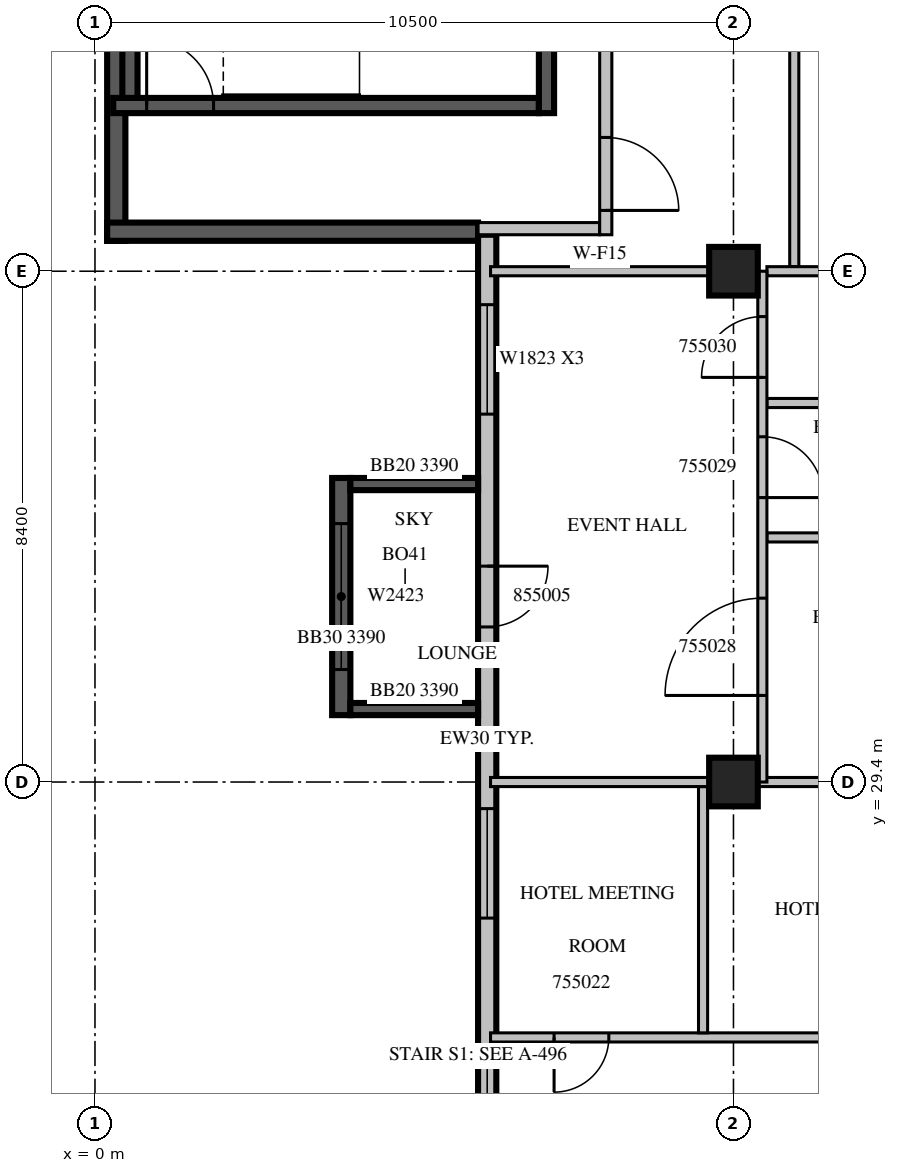
"""IFC4 building model, lengths in metres.
Left out: names, types, materials, properties, quantities, classifications, styles, units other than length and angle.
Written with IfcOpenShell. Run it as: python <this file> out.ifc"""

import sys

from ifc_helpers import new_model, si_unit, direction, frame, frame_2d, origin, origin_2d, place, context, subcontext, project, spatial, rectangle, extrude, source, transform, mapped, element, fill, save


model = new_model("IFC4")
c1 = context("Model", 3, precision=1e-05, world=origin(), true_north=direction((0.0, 1.0)))
c2 = subcontext(c1, "Body", "Model", "MODEL_VIEW")
j1 = project(units=[si_unit("LENGTHUNIT", "METRE"), si_unit("PLANEANGLEUNIT", "RADIAN")], contexts=[c1])
p1 = place(None, origin())
s1 = spatial("IfcSite", under=j1, at=p1, CompositionType="ELEMENT")
p2 = place(p1, origin())
s2 = spatial("IfcBuilding", under=s1, at=p2, CompositionType="ELEMENT")
p3 = place(p2, frame((0.0, 0.0, 242.4)))
s3 = spatial("IfcBuildingStorey", under=s2, at=p3, CompositionType="ELEMENT", Elevation=242.4)
m1 = source(origin(), c2, "Body", "SweptSolid", [
    extrude(rectangle(XDim=0.8, YDim=0.8, at=origin_2d()), origin(), (0.0, 0.0, 1.0), 3.8),
])
for number, where, z_axis, x_axis in (
    (1, (10.5, 29.4, 0.0), (0.0, 0.0, 1.0), (1.0, 0.0, 0.0)),
    (2, (10.5, 37.8, 0.0), (0.0, 0.0, 1.0), (1.0, 0.0, 0.0)),
):
    element("IfcColumn", number, at=place(p3, frame(where, z_axis=z_axis, x_axis=x_axis)), inside=s3, PredefinedType="COLUMN", context=c2, shape_type="MappedRepresentation", body=[
        mapped(m1, transform((0.0, 0.0, 0.0), scale=1.0)),
    ])
m2 = source(origin(), c2, "Body", "SweptSolid", [
    extrude(rectangle(XDim=5.65, YDim=0.3, at=frame_2d((2.825, 0.0))), origin(), (0.0, 0.0, 1.0), 3.4),
])
p4 = place(p3, frame((0.35, 43.95, 0.0), z_axis=(0.0, 0.0, 1.0), x_axis=(0.0, -1.0, 0.0)))
e3 = element("IfcWall", 3, at=p4, inside=s3, PredefinedType="SOLIDWALL", context=c2, shape_type="MappedRepresentation", body=[
    mapped(m2, transform((0.0, 0.0, 0.0), scale=1.0)),
])
m3 = source(origin(), c2, "Body", "SweptSolid", [
    extrude(rectangle(XDim=6.1, YDim=0.3, at=frame_2d((3.05, 0.0))), origin(), (0.0, 0.0, 1.0), 3.4),
])
p5 = place(p3, frame((0.2, 38.45, 0.0), z_axis=(0.0, 0.0, 1.0), x_axis=(1.0, 0.0, 0.0)))
e4 = element("IfcWall", 4, at=p5, inside=s3, PredefinedType="SOLIDWALL", context=c2, shape_type="MappedRepresentation", body=[
    mapped(m3, transform((0.0, 0.0, 0.0), scale=1.0)),
])
m4 = source(origin(), c2, "Body", "SweptSolid", [
    extrude(rectangle(XDim=16.6, YDim=0.3, at=frame_2d((8.3, 0.0))), origin(), (0.0, 0.0, 1.0), 3.4),
])
p6 = place(p3, frame((6.45, 38.4, 0.0), z_axis=(0.0, 0.0, 1.0), x_axis=(0.0, -1.0, 0.0)))
e5 = element("IfcWall", 5, at=p6, inside=s3, PredefinedType="STANDARD", context=c2, shape_type="MappedRepresentation", body=[
    mapped(m4, transform((0.0, 0.0, 0.0), scale=1.0)),
])
m5 = source(origin(), c2, "Body", "SweptSolid", [
    extrude(rectangle(XDim=1.8, YDim=2.3, at=frame_2d((0.9, 1.15))), frame((0.0, 0.16, 0.0), z_axis=(0.0, -1.0, 0.0), x_axis=(1.0, 0.0, 0.0)), (0.0, 0.0, 1.0), 0.32),
])
p7 = place(p6, frame((1.15, 0.0, 0.6)))
e6 = element("IfcOpeningElement", 6, at=p7, cuts=e5, PredefinedType="OPENING", context=c2, shape_type="MappedRepresentation", body=[
    mapped(m5, transform((0.0, 0.0, 0.0), scale=1.0)),
])
p8 = place(p6, frame((9.438, 0.0, 0.6)))
e7 = element("IfcOpeningElement", 7, at=p8, cuts=e5, PredefinedType="OPENING", context=c2, shape_type="MappedRepresentation", body=[
    mapped(m5, transform((0.0, 0.0, 0.0), scale=1.0)),
])
p9 = place(p6, frame((13.637, 0.0, 0.6)))
e8 = element("IfcOpeningElement", 8, at=p9, cuts=e5, PredefinedType="OPENING", context=c2, shape_type="MappedRepresentation", body=[
    mapped(m5, transform((0.0, 0.0, 0.0), scale=1.0)),
])
m6 = source(origin(), c2, "Body", "SweptSolid", [
    extrude(rectangle(XDim=1.0, YDim=2.1, at=frame_2d((0.5, 1.05))), frame((0.0, 0.16, 0.0), z_axis=(0.0, -1.0, 0.0), x_axis=(1.0, 0.0, 0.0)), (0.0, 0.0, 1.0), 0.32),
])
p10 = place(p6, frame((5.45, 0.0, 0.0)))
e9 = element("IfcOpeningElement", 9, at=p10, cuts=e5, PredefinedType="OPENING", context=c2, shape_type="MappedRepresentation", body=[
    mapped(m6, transform((0.0, 0.0, 0.0), scale=1.0)),
])
m7 = source(origin(), c2, "Body", "SweptSolid", [
    extrude(rectangle(XDim=3.9, YDim=0.3, at=frame_2d((1.95, 0.0))), origin(), (0.0, 0.0, 1.0), 3.39),
])
p11 = place(p3, frame((4.05, 34.4, 0.0), z_axis=(0.0, 0.0, 1.0), x_axis=(0.0, -1.0, 0.0)))
e10 = element("IfcWall", 10, at=p11, inside=s3, PredefinedType="SOLIDWALL", context=c2, shape_type="MappedRepresentation", body=[
    mapped(m7, transform((0.0, 0.0, 0.0), scale=1.0)),
])
m8 = source(origin(), c2, "Body", "SweptSolid", [
    extrude(rectangle(XDim=2.4, YDim=2.3, at=frame_2d((1.2, 1.15))), frame((0.0, 0.16, 0.0), z_axis=(0.0, -1.0, 0.0), x_axis=(1.0, 0.0, 0.0)), (0.0, 0.0, 1.0), 0.32),
])
p12 = place(p11, frame((0.75, 0.0, 0.6)))
e11 = element("IfcOpeningElement", 11, at=p12, cuts=e10, PredefinedType="OPENING", context=c2, shape_type="MappedRepresentation", body=[
    mapped(m8, transform((0.0, 0.0, 0.0), scale=1.0)),
])
m9 = source(origin(), c2, "Body", "SweptSolid", [
    extrude(rectangle(XDim=2.1, YDim=0.2, at=frame_2d((1.05, 0.0))), origin(), (0.0, 0.0, 1.0), 3.39),
])
for number, where, z_axis, x_axis in (
    (12, (6.3, 34.3, 0.0), (0.0, 0.0, 1.0), (-1.0, 0.0, 0.0)),
    (13, (6.3, 30.6, 0.0), (0.0, 0.0, 1.0), (-1.0, 0.0, 0.0)),
):
    element("IfcWall", number, at=place(p3, frame(where, z_axis=z_axis, x_axis=x_axis)), inside=s3, PredefinedType="SOLIDWALL", context=c2, shape_type="MappedRepresentation", body=[
        mapped(m9, transform((0.0, 0.0, 0.0), scale=1.0)),
    ])
m10 = source(origin(), c2, "Body", "SweptSolid", [
    extrude(rectangle(XDim=7.0, YDim=0.25, at=frame_2d((3.5, 0.0))), origin(), (0.0, 0.0, 1.0), 3.4),
])
p13 = place(p3, frame((0.3, 40.525, 0.0), z_axis=(0.0, 0.0, 1.0), x_axis=(1.0, 0.0, 0.0)))
e14 = element("IfcWall", 14, at=p13, inside=s3, PredefinedType="SOLIDWALL", context=c2, shape_type="MappedRepresentation", body=[
    mapped(m10, transform((0.0, 0.0, 0.0), scale=1.0)),
])
m11 = source(origin(), c2, "Body", "SweptSolid", [
    extrude(rectangle(XDim=1.1, YDim=2.1, at=frame_2d((0.55, 1.05))), frame((0.0, 0.135, 0.0), z_axis=(0.0, -1.0, 0.0), x_axis=(1.0, 0.0, 0.0)), (0.0, 0.0, 1.0), 0.27),
])
p14 = place(p13, frame((0.55, 0.0, 0.0)))
e15 = element("IfcOpeningElement", 15, at=p14, cuts=e14, PredefinedType="OPENING", context=c2, shape_type="MappedRepresentation", body=[
    mapped(m11, transform((0.0, 0.0, 0.0), scale=1.0)),
])
m12 = source(origin(), c2, "Body", "SweptSolid", [
    extrude(rectangle(XDim=3.45, YDim=0.25, at=frame_2d((1.725, 0.0))), origin(), (0.0, 0.0, 1.0), 3.4),
])
p15 = place(p3, frame((7.425, 40.4, 0.0), z_axis=(0.0, 0.0, 1.0), x_axis=(0.0, 1.0, 0.0)))
e16 = element("IfcWall", 16, at=p15, inside=s3, PredefinedType="SOLIDWALL", context=c2, shape_type="MappedRepresentation", body=[
    mapped(m12, transform((0.0, 0.0, 0.0), scale=1.0)),
])
m13 = source(origin(), c2, "Body", "SweptSolid", [
    extrude(rectangle(XDim=2.95, YDim=0.25, at=frame_2d((1.475, 0.0))), origin(), (0.0, 0.0, 1.0), 3.4),
])
p16 = place(p3, frame((0.575, 40.65, 0.0), z_axis=(0.0, 0.0, 1.0), x_axis=(0.0, 1.0, 0.0)))
e17 = element("IfcWall", 17, at=p16, inside=s3, PredefinedType="SOLIDWALL", context=c2, shape_type="MappedRepresentation", body=[
    mapped(m13, transform((0.0, 0.0, 0.0), scale=1.0)),
])
m14 = source(origin(), c2, "Body", "SweptSolid", [
    extrude(rectangle(XDim=2.0, YDim=0.2, at=frame_2d((1.0, 0.0))), origin(), (0.0, 0.0, 1.0), 3.4),
])
p17 = place(p3, frame((6.3, 38.5, 0.0), z_axis=(0.0, 0.0, 1.0), x_axis=(1.0, 0.0, 0.0)))
e18 = element("IfcWall", 18, at=p17, inside=s3, PredefinedType="PARTITIONING", context=c2, shape_type="MappedRepresentation", body=[
    mapped(m14, transform((0.0, 0.0, 0.0), scale=1.0)),
])
m15 = source(origin(), c2, "Body", "SweptSolid", [
    extrude(rectangle(XDim=5.45, YDim=0.2, at=frame_2d((2.725, 0.0))), origin(), (0.0, 0.0, 1.0), 3.4),
])
p18 = place(p3, frame((8.4, 38.4, 0.0), z_axis=(0.0, 0.0, 1.0), x_axis=(0.0, 1.0, 0.0)))
e19 = element("IfcWall", 19, at=p18, inside=s3, PredefinedType="PARTITIONING", context=c2, shape_type="MappedRepresentation", body=[
    mapped(m15, transform((0.0, 0.0, 0.0), scale=1.0)),
])
m16 = source(origin(), c2, "Body", "SweptSolid", [
    extrude(rectangle(XDim=1.2, YDim=2.1, at=frame_2d((0.6, 1.05))), frame((0.0, 0.11, 0.0), z_axis=(0.0, -1.0, 0.0), x_axis=(1.0, 0.0, 0.0)), (0.0, 0.0, 1.0), 0.22),
])
p19 = place(p18, frame((0.4, 0.0, 0.0)))
e20 = element("IfcOpeningElement", 20, at=p19, cuts=e19, PredefinedType="OPENING", context=c2, shape_type="MappedRepresentation", body=[
    mapped(m16, transform((0.0, 0.0, 0.0), scale=1.0)),
])
m17 = source(origin(), c2, "Body", "SweptSolid", [
    extrude(rectangle(XDim=0.9, YDim=2.1, at=frame_2d((0.45, 1.05))), frame((0.0, 0.11, 0.0), z_axis=(0.0, -1.0, 0.0), x_axis=(1.0, 0.0, 0.0)), (0.0, 0.0, 1.0), 0.22),
])
p20 = place(p18, frame((3.25, 0.0, 0.0)))
e21 = element("IfcOpeningElement", 21, at=p20, cuts=e19, PredefinedType="OPENING", context=c2, shape_type="MappedRepresentation", body=[
    mapped(m17, transform((0.0, 0.0, 0.0), scale=1.0)),
])
m18 = source(origin(), c2, "Body", "SweptSolid", [
    extrude(rectangle(XDim=8.195, YDim=0.15, at=frame_2d((4.098, 0.0))), origin(), (0.0, 0.0, 1.0), 3.4),
])
p21 = place(p3, frame((6.505, 25.2, 0.0), z_axis=(0.0, 0.0, 1.0), x_axis=(1.0, 0.0, 0.0)))
e22 = element("IfcWall", 22, at=p21, inside=s3, PredefinedType="PARTITIONING", context=c2, shape_type="MappedRepresentation", body=[
    mapped(m18, transform((0.0, 0.0, 0.0), scale=1.0)),
])
m19 = source(origin(), c2, "Body", "SweptSolid", [
    extrude(rectangle(XDim=0.9, YDim=2.1, at=frame_2d((0.45, 1.05))), frame((0.0, 0.085, 0.0), z_axis=(0.0, -1.0, 0.0), x_axis=(1.0, 0.0, 0.0)), (0.0, 0.0, 1.0), 0.17),
])
p22 = place(p21, frame((1.045, 0.0, 0.0)))
e23 = element("IfcOpeningElement", 23, at=p22, cuts=e22, PredefinedType="OPENING", context=c2, shape_type="MappedRepresentation", body=[
    mapped(m19, transform((0.0, 0.0, 0.0), scale=1.0)),
])
p23 = place(p21, frame((5.97, 0.0, 0.0)))
e24 = element("IfcOpeningElement", 24, at=p23, cuts=e22, PredefinedType="OPENING", context=c2, shape_type="MappedRepresentation", body=[
    mapped(m19, transform((0.0, 0.0, 0.0), scale=1.0)),
])
m20 = source(origin(), c2, "Body", "SweptSolid", [
    extrude(rectangle(XDim=4.05, YDim=0.15, at=frame_2d((2.025, 0.0))), origin(), (0.0, 0.0, 1.0), 3.4),
])
p24 = place(p3, frame((10.0, 25.275, 0.0), z_axis=(0.0, 0.0, 1.0), x_axis=(0.0, 1.0, 0.0)))
e25 = element("IfcWall", 25, at=p24, inside=s3, PredefinedType="PARTITIONING", context=c2, shape_type="MappedRepresentation", body=[
    mapped(m20, transform((0.0, 0.0, 0.0), scale=1.0)),
])
m21 = source(origin(), c2, "Body", "SweptSolid", [
    extrude(rectangle(XDim=3.596, YDim=0.15, at=frame_2d((1.798, 0.0))), origin(), (0.0, 0.0, 1.0), 3.4),
])
p25 = place(p3, frame((10.101, 29.4, 0.0), z_axis=(0.0, 0.0, 1.0), x_axis=(-1.0, 0.0, 0.0)))
e26 = element("IfcWall", 26, at=p25, inside=s3, PredefinedType="PARTITIONING", context=c2, shape_type="MappedRepresentation", body=[
    mapped(m21, transform((0.0, 0.0, 0.0), scale=1.0)),
])
m22 = source(origin(), c2, "Body", "SweptSolid", [
    extrude(rectangle(XDim=3.801, YDim=0.15, at=frame_2d((1.901, 0.0))), origin(), (0.0, 0.0, 1.0), 3.4),
])
p26 = place(p3, frame((14.7, 29.4, 0.0), z_axis=(0.0, 0.0, 1.0), x_axis=(-1.0, 0.0, 0.0)))
e27 = element("IfcWall", 27, at=p26, inside=s3, PredefinedType="PARTITIONING", context=c2, shape_type="MappedRepresentation", body=[
    mapped(m22, transform((0.0, 0.0, 0.0), scale=1.0)),
])
m23 = source(origin(), c2, "Body", "SweptSolid", [
    extrude(rectangle(XDim=6.45, YDim=0.15, at=frame_2d((3.225, 0.0))), origin(), (0.0, 0.0, 1.0), 3.4),
])
p27 = place(p3, frame((11.5, 44.325, 0.0), z_axis=(0.0, 0.0, 1.0), x_axis=(0.0, -1.0, 0.0)))
e28 = element("IfcWall", 28, at=p27, inside=s3, PredefinedType="PARTITIONING", context=c2, shape_type="MappedRepresentation", body=[
    mapped(m23, transform((0.0, 0.0, 0.0), scale=1.0)),
])
m24 = source(origin(), c2, "Body", "SweptSolid", [
    extrude(rectangle(XDim=3.65, YDim=0.15, at=frame_2d((1.825, 0.0))), origin(), (0.0, 0.0, 1.0), 3.4),
])
for number, where, z_axis, x_axis in (
    (29, (14.7, 33.422, 0.0), (0.0, 0.0, 1.0), (-1.0, 0.0, 0.0)),
    (30, (14.7, 35.633, 0.0), (0.0, 0.0, 1.0), (-1.0, 0.0, 0.0)),
):
    element("IfcWall", number, at=place(p3, frame(where, z_axis=z_axis, x_axis=x_axis)), inside=s3, PredefinedType="PARTITIONING", context=c2, shape_type="MappedRepresentation", body=[
        mapped(m24, transform((0.0, 0.0, 0.0), scale=1.0)),
    ])
p28 = place(p3, frame((10.101, 37.8, 0.0), z_axis=(0.0, 0.0, 1.0), x_axis=(-1.0, 0.0, 0.0)))
e31 = element("IfcWall", 31, at=p28, inside=s3, PredefinedType="PARTITIONING", context=c2, shape_type="MappedRepresentation", body=[
    mapped(m21, transform((0.0, 0.0, 0.0), scale=1.0)),
])
p29 = place(p3, frame((14.7, 37.8, 0.0), z_axis=(0.0, 0.0, 1.0), x_axis=(-1.0, 0.0, 0.0)))
e32 = element("IfcWall", 32, at=p29, inside=s3, PredefinedType="PARTITIONING", context=c2, shape_type="MappedRepresentation", body=[
    mapped(m24, transform((0.0, 0.0, 0.0), scale=1.0)),
])
m25 = source(origin(), c2, "Body", "SweptSolid", [
    extrude(rectangle(XDim=8.4, YDim=0.15, at=frame_2d((4.2, 0.0))), origin(), (0.0, 0.0, 1.0), 3.4),
])
p30 = place(p3, frame((10.975, 29.4, 0.0), z_axis=(0.0, 0.0, 1.0), x_axis=(0.0, 1.0, 0.0)))
e33 = element("IfcWall", 33, at=p30, inside=s3, PredefinedType="PARTITIONING", context=c2, shape_type="MappedRepresentation", body=[
    mapped(m25, transform((0.0, 0.0, 0.0), scale=1.0)),
])
m26 = source(origin(), c2, "Body", "SweptSolid", [
    extrude(rectangle(XDim=1.6, YDim=2.1, at=frame_2d((0.8, 1.05))), frame((0.0, 0.085, 0.0), z_axis=(0.0, -1.0, 0.0), x_axis=(1.0, 0.0, 0.0)), (0.0, 0.0, 1.0), 0.17),
])
p31 = place(p30, frame((1.424, 0.0, 0.0)))
e34 = element("IfcOpeningElement", 34, at=p31, cuts=e33, PredefinedType="OPENING", context=c2, shape_type="MappedRepresentation", body=[
    mapped(m26, transform((0.0, 0.0, 0.0), scale=1.0)),
])
m27 = source(origin(), c2, "Body", "SweptSolid", [
    extrude(rectangle(XDim=1.0, YDim=2.1, at=frame_2d((0.5, 1.05))), frame((0.0, 0.085, 0.0), z_axis=(0.0, -1.0, 0.0), x_axis=(1.0, 0.0, 0.0)), (0.0, 0.0, 1.0), 0.17),
])
p32 = place(p30, frame((4.678, 0.0, 0.0)))
e35 = element("IfcOpeningElement", 35, at=p32, cuts=e33, PredefinedType="OPENING", context=c2, shape_type="MappedRepresentation", body=[
    mapped(m27, transform((0.0, 0.0, 0.0), scale=1.0)),
])
p33 = place(p30, frame((6.654, 0.0, 0.0)))
e36 = element("IfcOpeningElement", 36, at=p33, cuts=e33, PredefinedType="OPENING", context=c2, shape_type="MappedRepresentation", body=[
    mapped(m27, transform((0.0, 0.0, 0.0), scale=1.0)),
])
m28 = source(origin(), c2, "Body", "SweptSolid", [
    extrude(rectangle(XDim=1.8, YDim=2.3, at=frame_2d((0.9, 1.15))), frame((0.0, 0.03, 0.0), z_axis=(0.0, -1.0, 0.0), x_axis=(1.0, 0.0, 0.0)), (0.0, 0.0, 1.0), 0.06),
])
p34 = place(p7, origin())
e37 = element("IfcWindow", 37, at=p34, inside=s3, PartitioningType="SINGLE_PANEL", PredefinedType="WINDOW", context=c2, shape_type="MappedRepresentation", body=[
    mapped(m28, transform((0.0, 0.0, 0.0), scale=1.0)),
])
fill(e6, e37)
p35 = place(p8, origin())
e38 = element("IfcWindow", 38, at=p35, inside=s3, PartitioningType="SINGLE_PANEL", PredefinedType="WINDOW", context=c2, shape_type="MappedRepresentation", body=[
    mapped(m28, transform((0.0, 0.0, 0.0), scale=1.0)),
])
fill(e7, e38)
p36 = place(p9, origin())
e39 = element("IfcWindow", 39, at=p36, inside=s3, PartitioningType="SINGLE_PANEL", PredefinedType="WINDOW", context=c2, shape_type="MappedRepresentation", body=[
    mapped(m28, transform((0.0, 0.0, 0.0), scale=1.0)),
])
fill(e8, e39)
m29 = source(origin(), c2, "Body", "SweptSolid", [
    extrude(rectangle(XDim=2.4, YDim=2.3, at=frame_2d((1.2, 1.15))), frame((0.0, 0.03, 0.0), z_axis=(0.0, -1.0, 0.0), x_axis=(1.0, 0.0, 0.0)), (0.0, 0.0, 1.0), 0.06),
])
p37 = place(p12, origin())
e40 = element("IfcWindow", 40, at=p37, inside=s3, PartitioningType="SINGLE_PANEL", PredefinedType="WINDOW", context=c2, shape_type="MappedRepresentation", body=[
    mapped(m29, transform((0.0, 0.0, 0.0), scale=1.0)),
])
fill(e11, e40)
m30 = source(origin(), c2, "Body", "SweptSolid", [
    extrude(rectangle(XDim=1.1, YDim=2.1, at=frame_2d((0.55, 1.05))), frame((0.0, 0.025, 0.0), z_axis=(0.0, -1.0, 0.0), x_axis=(1.0, 0.0, 0.0)), (0.0, 0.0, 1.0), 0.05),
])
p38 = place(p14, origin())
e41 = element("IfcDoor", 41, at=p38, inside=s3, OperationType="SINGLE_SWING_LEFT", PredefinedType="DOOR", context=c2, shape_type="MappedRepresentation", body=[
    mapped(m30, transform((0.0, 0.0, 0.0), scale=1.0)),
])
fill(e15, e41)
m31 = source(origin(), c2, "Body", "SweptSolid", [
    extrude(rectangle(XDim=1.2, YDim=2.1, at=frame_2d((0.6, 1.05))), frame((0.0, 0.025, 0.0), z_axis=(0.0, -1.0, 0.0), x_axis=(1.0, 0.0, 0.0)), (0.0, 0.0, 1.0), 0.05),
])
p39 = place(p19, origin())
e42 = element("IfcDoor", 42, at=p39, inside=s3, OperationType="SINGLE_SWING_RIGHT", PredefinedType="DOOR", context=c2, shape_type="MappedRepresentation", body=[
    mapped(m31, transform((0.0, 0.0, 0.0), scale=1.0)),
])
fill(e20, e42)
m32 = source(origin(), c2, "Body", "SweptSolid", [
    extrude(rectangle(XDim=0.9, YDim=2.1, at=frame_2d((0.45, 1.05))), frame((0.0, 0.025, 0.0), z_axis=(0.0, -1.0, 0.0), x_axis=(1.0, 0.0, 0.0)), (0.0, 0.0, 1.0), 0.05),
])
p40 = place(p22, origin())
e43 = element("IfcDoor", 43, at=p40, inside=s3, OperationType="SINGLE_SWING_RIGHT", PredefinedType="DOOR", context=c2, shape_type="MappedRepresentation", body=[
    mapped(m32, transform((0.0, 0.0, 0.0), scale=1.0)),
])
fill(e23, e43)
m33 = source(origin(), c2, "Body", "SweptSolid", [
    extrude(rectangle(XDim=1.6, YDim=2.1, at=frame_2d((0.8, 1.05))), frame((0.0, 0.025, 0.0), z_axis=(0.0, -1.0, 0.0), x_axis=(1.0, 0.0, 0.0)), (0.0, 0.0, 1.0), 0.05),
])
p41 = place(p31, origin())
e44 = element("IfcDoor", 44, at=p41, inside=s3, OperationType="SINGLE_SWING_LEFT", PredefinedType="DOOR", context=c2, shape_type="MappedRepresentation", body=[
    mapped(m33, transform((0.0, 0.0, 0.0), scale=1.0)),
])
fill(e34, e44)
m34 = source(origin(), c2, "Body", "SweptSolid", [
    extrude(rectangle(XDim=1.0, YDim=2.1, at=frame_2d((0.5, 1.05))), frame((0.0, 0.025, 0.0), z_axis=(0.0, -1.0, 0.0), x_axis=(1.0, 0.0, 0.0)), (0.0, 0.0, 1.0), 0.05),
])
p42 = place(p32, origin())
e45 = element("IfcDoor", 45, at=p42, inside=s3, OperationType="SINGLE_SWING_RIGHT", PredefinedType="DOOR", context=c2, shape_type="MappedRepresentation", body=[
    mapped(m34, transform((0.0, 0.0, 0.0), scale=1.0)),
])
fill(e35, e45)
p43 = place(p33, origin())
e46 = element("IfcDoor", 46, at=p43, inside=s3, OperationType="SINGLE_SWING_LEFT", PredefinedType="DOOR", context=c2, shape_type="MappedRepresentation", body=[
    mapped(m34, transform((0.0, 0.0, 0.0), scale=1.0)),
])
fill(e36, e46)
p44 = place(p10, origin())
e47 = element("IfcDoor", 47, at=p44, inside=s3, OperationType="SINGLE_SWING_LEFT", PredefinedType="DOOR", context=c2, shape_type="MappedRepresentation", body=[
    mapped(m34, transform((0.0, 0.0, 0.0), scale=1.0)),
])
fill(e9, e47)
save(model, sys.argv[1])
